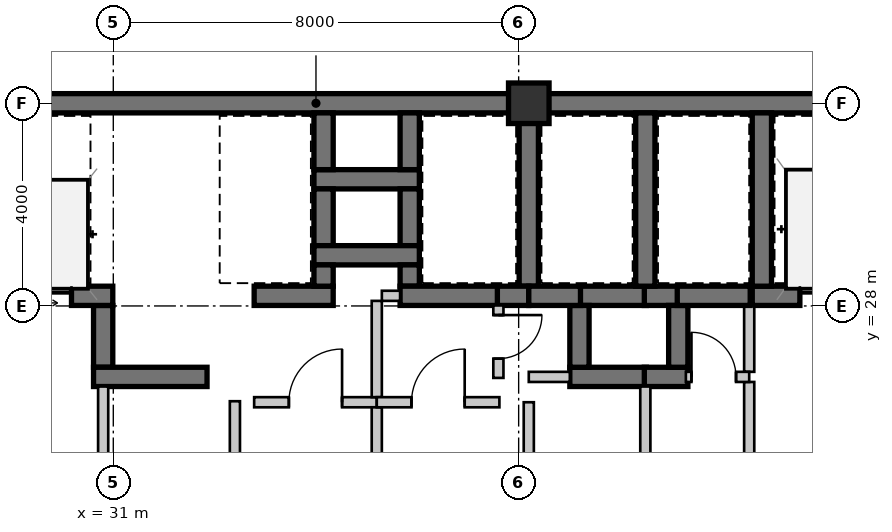
"""IFC4 building model, lengths in metres.
Left out: names, types, materials, properties, quantities, classifications, styles, units other than length and angle.
Written with IfcOpenShell. Run it as: python <this file> out.ifc"""

import sys

from ifc_helpers import new_model, si_unit, direction, frame, frame_2d, origin, origin_2d, place, context, subcontext, project, spatial, rectangle, extrude, source, transform, mapped, element, fill, save


model = new_model("IFC4")
c1 = context("Model", 3, precision=1e-05, world=origin(), true_north=direction((0.0, 1.0)))
c2 = subcontext(c1, "Body", "Model", "MODEL_VIEW")
j1 = project(units=[si_unit("LENGTHUNIT", "METRE"), si_unit("PLANEANGLEUNIT", "RADIAN")], contexts=[c1])
p1 = place(None, origin())
s1 = spatial("IfcSite", under=j1, at=p1, CompositionType="ELEMENT")
p2 = place(p1, origin())
s2 = spatial("IfcBuilding", under=s1, at=p2, CompositionType="ELEMENT")
p3 = place(p2, frame((0.0, 0.0, 26.25)))
s3 = spatial("IfcBuildingStorey", under=s2, at=p3, CompositionType="ELEMENT", Elevation=26.25)
m1 = source(origin(), c2, "Body", "SweptSolid", [
    extrude(rectangle(XDim=0.8, YDim=0.8, at=origin_2d()), origin(), (0.0, 0.0, 1.0), 3.15),
])
p4 = place(p3, frame((39.2, 32.0, 0.0), z_axis=(0.0, 0.0, 1.0), x_axis=(1.0, 0.0, 0.0)))
e1 = element("IfcColumn", 1, at=p4, inside=s3, PredefinedType="COLUMN", context=c2, shape_type="MappedRepresentation", body=[
    mapped(m1, transform((0.0, 0.0, 0.0), scale=1.0)),
])
m2 = source(origin(), c2, "Body", "SweptSolid", [
    extrude(rectangle(XDim=11.2, YDim=0.38, at=frame_2d((5.6, 0.0))), origin(), (0.0, 0.0, 1.0), 2.93),
])
p5 = place(p3, frame((28.0, 32.0, 0.0), z_axis=(0.0, 0.0, 1.0), x_axis=(1.0, 0.0, 0.0)))
e2 = element("IfcWall", 2, at=p5, inside=s3, PredefinedType="SHEAR", context=c2, shape_type="MappedRepresentation", body=[
    mapped(m2, transform((0.0, 0.0, 0.0), scale=1.0)),
])
m3 = source(origin(), c2, "Body", "SweptSolid", [
    extrude(rectangle(XDim=11.99, YDim=0.38, at=frame_2d((5.995, 0.0))), origin(), (0.0, 0.0, 1.0), 2.93),
])
p6 = place(p3, frame((39.2, 32.0, 0.0), z_axis=(0.0, 0.0, 1.0), x_axis=(1.0, 0.0, 0.0)))
e3 = element("IfcWall", 3, at=p6, inside=s3, PredefinedType="SHEAR", context=c2, shape_type="MappedRepresentation", body=[
    mapped(m3, transform((0.0, 0.0, 0.0), scale=1.0)),
])
m4 = source(origin(), c2, "Body", "SweptSolid", [
    extrude(rectangle(XDim=2.98, YDim=0.38, at=frame_2d((1.49, 0.0))), origin(), (0.0, 0.0, 1.0), 2.93),
])
p7 = place(p3, frame((43.61, 28.2, 0.0), z_axis=(0.0, 0.0, 1.0), x_axis=(1.0, 0.0, 0.0)))
e4 = element("IfcWall", 4, at=p7, inside=s3, PredefinedType="SHEAR", context=c2, shape_type="MappedRepresentation", body=[
    mapped(m4, transform((0.0, 0.0, 0.0), scale=1.0)),
])
m5 = source(origin(), c2, "Body", "SweptSolid", [
    extrude(rectangle(XDim=1.1, YDim=2.15, at=frame_2d((0.55, 1.075))), frame((0.0, 0.2, 0.0), z_axis=(0.0, -1.0, 0.0), x_axis=(1.0, 0.0, 0.0)), (0.0, 0.0, 1.0), 0.4),
])
p8 = place(p7, frame((0.94, 0.0, 0.0)))
e5 = element("IfcOpeningElement", 5, at=p8, cuts=e4, PredefinedType="OPENING", context=c2, shape_type="MappedRepresentation", body=[
    mapped(m5, transform((0.0, 0.0, 0.0), scale=1.0)),
])
m6 = source(origin(), c2, "Body", "SweptSolid", [
    extrude(rectangle(XDim=3.42, YDim=0.38, at=frame_2d((1.71, 0.0))), origin(), (0.0, 0.0, 1.0), 2.93),
])
p9 = place(p3, frame((43.8, 31.81, 0.0), z_axis=(0.0, 0.0, 1.0), x_axis=(0.0, -1.0, 0.0)))
e6 = element("IfcWall", 6, at=p9, inside=s3, PredefinedType="SHEAR", context=c2, shape_type="MappedRepresentation", body=[
    mapped(m6, transform((0.0, 0.0, 0.0), scale=1.0)),
])
m7 = source(origin(), c2, "Body", "SweptSolid", [
    extrude(rectangle(XDim=2.4, YDim=0.2, at=frame_2d((1.2, 0.0))), origin(), (0.0, 0.0, 1.0), 2.93),
])
p10 = place(p3, frame((43.55, 26.5, 0.0), z_axis=(0.0, 0.0, 1.0), x_axis=(0.0, -1.0, 0.0)))
e7 = element("IfcWall", 7, at=p10, inside=s3, PredefinedType="SOLIDWALL", context=c2, shape_type="MappedRepresentation", body=[
    mapped(m7, transform((0.0, 0.0, 0.0), scale=1.0)),
])
m8 = source(origin(), c2, "Body", "SweptSolid", [
    extrude(rectangle(XDim=1.31, YDim=0.2, at=frame_2d((0.655, 0.0))), origin(), (0.0, 0.0, 1.0), 2.93),
])
p11 = place(p3, frame((43.55, 28.01, 0.0), z_axis=(0.0, 0.0, 1.0), x_axis=(0.0, -1.0, 0.0)))
e8 = element("IfcWall", 8, at=p11, inside=s3, PredefinedType="SOLIDWALL", context=c2, shape_type="MappedRepresentation", body=[
    mapped(m8, transform((0.0, 0.0, 0.0), scale=1.0)),
])
m9 = source(origin(), c2, "Body", "SweptSolid", [
    extrude(rectangle(XDim=2.08, YDim=0.38, at=frame_2d((1.04, 0.0))), origin(), (0.0, 0.0, 1.0), 2.93),
])
p12 = place(p3, frame((34.96, 30.5, 0.0), z_axis=(0.0, 0.0, 1.0), x_axis=(1.0, 0.0, 0.0)))
e9 = element("IfcWall", 9, at=p12, inside=s3, PredefinedType="SHEAR", context=c2, shape_type="MappedRepresentation", body=[
    mapped(m9, transform((0.0, 0.0, 0.0), scale=1.0)),
])
m10 = source(origin(), c2, "Body", "SweptSolid", [
    extrude(rectangle(XDim=1.12, YDim=0.38, at=frame_2d((0.56, 0.0))), origin(), (0.0, 0.0, 1.0), 2.93),
])
for number, where, z_axis, x_axis in (
    (10, (35.15, 31.81, 0.0), (0.0, 0.0, 1.0), (0.0, -1.0, 0.0)),
    (11, (36.85, 30.69, 0.0), (0.0, 0.0, 1.0), (0.0, 1.0, 0.0)),
    (12, (35.15, 30.31, 0.0), (0.0, 0.0, 1.0), (0.0, -1.0, 0.0)),
    (13, (36.85, 29.19, 0.0), (0.0, 0.0, 1.0), (0.0, 1.0, 0.0)),
):
    element("IfcWall", number, at=place(p3, frame(where, z_axis=z_axis, x_axis=x_axis)), inside=s3, PredefinedType="SHEAR", context=c2, shape_type="MappedRepresentation", body=[
        mapped(m10, transform((0.0, 0.0, 0.0), scale=1.0)),
    ])
p13 = place(p3, frame((34.96, 29.0, 0.0), z_axis=(0.0, 0.0, 1.0), x_axis=(1.0, 0.0, 0.0)))
e14 = element("IfcWall", 14, at=p13, inside=s3, PredefinedType="SHEAR", context=c2, shape_type="MappedRepresentation", body=[
    mapped(m9, transform((0.0, 0.0, 0.0), scale=1.0)),
])
m11 = source(origin(), c2, "Body", "SweptSolid", [
    extrude(rectangle(XDim=1.22, YDim=0.38, at=frame_2d((0.61, 0.0))), origin(), (0.0, 0.0, 1.0), 2.93),
])
p14 = place(p3, frame((30.8, 28.01, 0.0), z_axis=(0.0, 0.0, 1.0), x_axis=(0.0, -1.0, 0.0)))
e15 = element("IfcWall", 15, at=p14, inside=s3, PredefinedType="SHEAR", context=c2, shape_type="MappedRepresentation", body=[
    mapped(m11, transform((0.0, 0.0, 0.0), scale=1.0)),
])
m12 = source(origin(), c2, "Body", "SweptSolid", [
    extrude(rectangle(XDim=2.24, YDim=0.38, at=frame_2d((1.12, 0.0))), origin(), (0.0, 0.0, 1.0), 2.93),
])
p15 = place(p3, frame((30.61, 26.6, 0.0), z_axis=(0.0, 0.0, 1.0), x_axis=(1.0, 0.0, 0.0)))
e16 = element("IfcWall", 16, at=p15, inside=s3, PredefinedType="SHEAR", context=c2, shape_type="MappedRepresentation", body=[
    mapped(m12, transform((0.0, 0.0, 0.0), scale=1.0)),
])
m13 = source(origin(), c2, "Body", "SweptSolid", [
    extrude(rectangle(XDim=1.32, YDim=0.38, at=frame_2d((0.66, 0.0))), origin(), (0.0, 0.0, 1.0), 2.93),
])
p16 = place(p3, frame((41.52, 28.2, 0.0), z_axis=(0.0, 0.0, 1.0), x_axis=(-1.0, 0.0, 0.0)))
e17 = element("IfcWall", 17, at=p16, inside=s3, PredefinedType="SHEAR", context=c2, shape_type="MappedRepresentation", body=[
    mapped(m13, transform((0.0, 0.0, 0.0), scale=1.0)),
])
m14 = source(origin(), c2, "Body", "SweptSolid", [
    extrude(rectangle(XDim=0.67, YDim=0.38, at=frame_2d((0.335, 0.0))), origin(), (0.0, 0.0, 1.0), 2.93),
])
p17 = place(p3, frame((42.15, 28.2, 0.0), z_axis=(0.0, 0.0, 1.0), x_axis=(-1.0, 0.0, 0.0)))
e18 = element("IfcWall", 18, at=p17, inside=s3, PredefinedType="SHEAR", context=c2, shape_type="MappedRepresentation", body=[
    mapped(m14, transform((0.0, 0.0, 0.0), scale=1.0)),
])
m15 = source(origin(), c2, "Body", "SweptSolid", [
    extrude(rectangle(XDim=1.51, YDim=0.38, at=frame_2d((0.755, 0.0))), origin(), (0.0, 0.0, 1.0), 2.93),
])
p18 = place(p3, frame((40.01, 26.6, 0.0), z_axis=(0.0, 0.0, 1.0), x_axis=(1.0, 0.0, 0.0)))
e19 = element("IfcWall", 19, at=p18, inside=s3, PredefinedType="SHEAR", context=c2, shape_type="MappedRepresentation", body=[
    mapped(m15, transform((0.0, 0.0, 0.0), scale=1.0)),
])
p19 = place(p3, frame((40.2, 28.01, 0.0), z_axis=(0.0, 0.0, 1.0), x_axis=(0.0, -1.0, 0.0)))
e20 = element("IfcWall", 20, at=p19, inside=s3, PredefinedType="SHEAR", context=c2, shape_type="MappedRepresentation", body=[
    mapped(m11, transform((0.0, 0.0, 0.0), scale=1.0)),
])
m16 = source(origin(), c2, "Body", "SweptSolid", [
    extrude(rectangle(XDim=0.86, YDim=0.38, at=frame_2d((0.43, 0.0))), origin(), (0.0, 0.0, 1.0), 2.93),
])
p20 = place(p3, frame((41.48, 26.6, 0.0), z_axis=(0.0, 0.0, 1.0), x_axis=(1.0, 0.0, 0.0)))
e21 = element("IfcWall", 21, at=p20, inside=s3, PredefinedType="SHEAR", context=c2, shape_type="MappedRepresentation", body=[
    mapped(m16, transform((0.0, 0.0, 0.0), scale=1.0)),
])
p21 = place(p3, frame((42.15, 26.79, 0.0), z_axis=(0.0, 0.0, 1.0), x_axis=(0.0, 1.0, 0.0)))
e22 = element("IfcWall", 22, at=p21, inside=s3, PredefinedType="SHEAR", context=c2, shape_type="MappedRepresentation", body=[
    mapped(m11, transform((0.0, 0.0, 0.0), scale=1.0)),
])
m17 = source(origin(), c2, "Body", "SweptSolid", [
    extrude(rectangle(XDim=2.49, YDim=0.38, at=frame_2d((1.245, 0.0))), origin(), (0.0, 0.0, 1.0), 2.93),
])
p22 = place(p3, frame((28.5, 28.2, 0.0), z_axis=(0.0, 0.0, 1.0), x_axis=(1.0, 0.0, 0.0)))
e23 = element("IfcWall", 23, at=p22, inside=s3, PredefinedType="SHEAR", context=c2, shape_type="MappedRepresentation", body=[
    mapped(m17, transform((0.0, 0.0, 0.0), scale=1.0)),
])
m18 = source(origin(), c2, "Body", "SweptSolid", [
    extrude(rectangle(XDim=1.05, YDim=2.15, at=frame_2d((0.525, 1.075))), frame((0.0, 0.2, 0.0), z_axis=(0.0, -1.0, 0.0), x_axis=(1.0, 0.0, 0.0)), (0.0, 0.0, 1.0), 0.4),
])
p23 = place(p22, frame((0.625, 0.0, 0.0)))
e24 = element("IfcOpeningElement", 24, at=p23, cuts=e23, PredefinedType="OPENING", context=c2, shape_type="MappedRepresentation", body=[
    mapped(m18, transform((0.0, 0.0, 0.0), scale=1.0)),
])
m19 = source(origin(), c2, "Body", "SweptSolid", [
    extrude(rectangle(XDim=2.31, YDim=0.2, at=frame_2d((1.155, 0.0))), origin(), (0.0, 0.0, 1.0), 2.93),
])
p24 = place(p3, frame((30.8, 26.41, 0.0), z_axis=(0.0, 0.0, 1.0), x_axis=(0.0, -1.0, 0.0)))
e25 = element("IfcWall", 25, at=p24, inside=s3, PredefinedType="SOLIDWALL", context=c2, shape_type="MappedRepresentation", body=[
    mapped(m19, transform((0.0, 0.0, 0.0), scale=1.0)),
])
m20 = source(origin(), c2, "Body", "SweptSolid", [
    extrude(rectangle(XDim=1.56, YDim=0.38, at=frame_2d((0.78, 0.0))), origin(), (0.0, 0.0, 1.0), 2.93),
])
p25 = place(p3, frame((33.78, 28.2, 0.0), z_axis=(0.0, 0.0, 1.0), x_axis=(1.0, 0.0, 0.0)))
e26 = element("IfcWall", 26, at=p25, inside=s3, PredefinedType="SHEAR", context=c2, shape_type="MappedRepresentation", body=[
    mapped(m20, transform((0.0, 0.0, 0.0), scale=1.0)),
])
m21 = source(origin(), c2, "Body", "SweptSolid", [
    extrude(rectangle(XDim=0.42, YDim=0.38, at=frame_2d((0.21, 0.0))), origin(), (0.0, 0.0, 1.0), 2.93),
])
p26 = place(p3, frame((35.15, 28.39, 0.0), z_axis=(0.0, 0.0, 1.0), x_axis=(0.0, 1.0, 0.0)))
e27 = element("IfcWall", 27, at=p26, inside=s3, PredefinedType="SHEAR", context=c2, shape_type="MappedRepresentation", body=[
    mapped(m21, transform((0.0, 0.0, 0.0), scale=1.0)),
])
p27 = place(p3, frame((39.2, 28.39, 0.0), z_axis=(0.0, 0.0, 1.0), x_axis=(0.0, 1.0, 0.0)))
e28 = element("IfcWall", 28, at=p27, inside=s3, PredefinedType="SHEAR", context=c2, shape_type="MappedRepresentation", body=[
    mapped(m6, transform((0.0, 0.0, 0.0), scale=1.0)),
])
p28 = place(p3, frame((36.85, 28.81, 0.0), z_axis=(0.0, 0.0, 1.0), x_axis=(0.0, -1.0, 0.0)))
e29 = element("IfcWall", 29, at=p28, inside=s3, PredefinedType="SHEAR", context=c2, shape_type="MappedRepresentation", body=[
    mapped(m21, transform((0.0, 0.0, 0.0), scale=1.0)),
])
m22 = source(origin(), c2, "Body", "SweptSolid", [
    extrude(rectangle(XDim=1.96, YDim=0.38, at=frame_2d((0.98, 0.0))), origin(), (0.0, 0.0, 1.0), 2.93),
])
p29 = place(p3, frame((36.66, 28.2, 0.0), z_axis=(0.0, 0.0, 1.0), x_axis=(1.0, 0.0, 0.0)))
e30 = element("IfcWall", 30, at=p29, inside=s3, PredefinedType="SHEAR", context=c2, shape_type="MappedRepresentation", body=[
    mapped(m22, transform((0.0, 0.0, 0.0), scale=1.0)),
])
m23 = source(origin(), c2, "Body", "SweptSolid", [
    extrude(rectangle(XDim=0.62, YDim=0.38, at=frame_2d((0.31, 0.0))), origin(), (0.0, 0.0, 1.0), 2.93),
])
p30 = place(p3, frame((38.58, 28.2, 0.0), z_axis=(0.0, 0.0, 1.0), x_axis=(1.0, 0.0, 0.0)))
e31 = element("IfcWall", 31, at=p30, inside=s3, PredefinedType="SHEAR", context=c2, shape_type="MappedRepresentation", body=[
    mapped(m23, transform((0.0, 0.0, 0.0), scale=1.0)),
])
p31 = place(p3, frame((41.5, 28.39, 0.0), z_axis=(0.0, 0.0, 1.0), x_axis=(0.0, 1.0, 0.0)))
e32 = element("IfcWall", 32, at=p31, inside=s3, PredefinedType="SHEAR", context=c2, shape_type="MappedRepresentation", body=[
    mapped(m6, transform((0.0, 0.0, 0.0), scale=1.0)),
])
m24 = source(origin(), c2, "Body", "SweptSolid", [
    extrude(rectangle(XDim=1.02, YDim=0.38, at=frame_2d((0.51, 0.0))), origin(), (0.0, 0.0, 1.0), 2.93),
])
p32 = place(p3, frame((39.2, 28.2, 0.0), z_axis=(0.0, 0.0, 1.0), x_axis=(1.0, 0.0, 0.0)))
e33 = element("IfcWall", 33, at=p32, inside=s3, PredefinedType="SHEAR", context=c2, shape_type="MappedRepresentation", body=[
    mapped(m24, transform((0.0, 0.0, 0.0), scale=1.0)),
])
m25 = source(origin(), c2, "Body", "SweptSolid", [
    extrude(rectangle(XDim=1.44, YDim=0.38, at=frame_2d((0.72, 0.0))), origin(), (0.0, 0.0, 1.0), 2.93),
])
p33 = place(p3, frame((42.13, 28.2, 0.0), z_axis=(0.0, 0.0, 1.0), x_axis=(1.0, 0.0, 0.0)))
e34 = element("IfcWall", 34, at=p33, inside=s3, PredefinedType="SHEAR", context=c2, shape_type="MappedRepresentation", body=[
    mapped(m25, transform((0.0, 0.0, 0.0), scale=1.0)),
])
m26 = source(origin(), c2, "Body", "SweptSolid", [
    extrude(rectangle(XDim=2.02, YDim=0.2, at=frame_2d((1.01, 0.0))), origin(), (0.0, 0.0, 1.0), 2.93),
])
p34 = place(p3, frame((33.4, 26.12, 0.0), z_axis=(0.0, 0.0, 1.0), x_axis=(0.0, -1.0, 0.0)))
e35 = element("IfcWall", 35, at=p34, inside=s3, PredefinedType="SOLIDWALL", context=c2, shape_type="MappedRepresentation", body=[
    mapped(m26, transform((0.0, 0.0, 0.0), scale=1.0)),
])
m27 = source(origin(), c2, "Body", "SweptSolid", [
    extrude(rectangle(XDim=2.42, YDim=0.2, at=frame_2d((1.21, 0.0))), origin(), (0.0, 0.0, 1.0), 2.93),
])
p35 = place(p3, frame((33.78, 26.1, 0.0), z_axis=(0.0, 0.0, 1.0), x_axis=(1.0, 0.0, 0.0)))
e36 = element("IfcWall", 36, at=p35, inside=s3, PredefinedType="SOLIDWALL", context=c2, shape_type="MappedRepresentation", body=[
    mapped(m27, transform((0.0, 0.0, 0.0), scale=1.0)),
])
m28 = source(origin(), c2, "Body", "SweptSolid", [
    extrude(rectangle(XDim=1.05, YDim=2.1, at=frame_2d((0.525, 1.05))), frame((0.0, 0.11, 0.0), z_axis=(0.0, -1.0, 0.0), x_axis=(1.0, 0.0, 0.0)), (0.0, 0.0, 1.0), 0.22),
])
p36 = place(p35, frame((0.685, 0.0, 0.0)))
e37 = element("IfcOpeningElement", 37, at=p36, cuts=e36, PredefinedType="OPENING", context=c2, shape_type="MappedRepresentation", body=[
    mapped(m28, transform((0.0, 0.0, 0.0), scale=1.0)),
])
m29 = source(origin(), c2, "Body", "SweptSolid", [
    extrude(rectangle(XDim=1.9, YDim=0.2, at=frame_2d((0.95, 0.0))), origin(), (0.0, 0.0, 1.0), 2.93),
])
p37 = place(p3, frame((36.2, 26.0, 0.0), z_axis=(0.0, 0.0, 1.0), x_axis=(0.0, -1.0, 0.0)))
e38 = element("IfcWall", 38, at=p37, inside=s3, PredefinedType="SOLIDWALL", context=c2, shape_type="MappedRepresentation", body=[
    mapped(m29, transform((0.0, 0.0, 0.0), scale=1.0)),
])
m30 = source(origin(), c2, "Body", "SweptSolid", [
    extrude(rectangle(XDim=1.9, YDim=0.2, at=frame_2d((0.95, 0.0))), origin(), (0.0, 0.0, 1.0), 2.93),
])
p38 = place(p3, frame((36.2, 28.1, 0.0), z_axis=(0.0, 0.0, 1.0), x_axis=(0.0, -1.0, 0.0)))
e39 = element("IfcWall", 39, at=p38, inside=s3, PredefinedType="SOLIDWALL", context=c2, shape_type="MappedRepresentation", body=[
    mapped(m30, transform((0.0, 0.0, 0.0), scale=1.0)),
])
m31 = source(origin(), c2, "Body", "SweptSolid", [
    extrude(rectangle(XDim=0.36, YDim=0.2, at=frame_2d((0.18, 0.0))), origin(), (0.0, 0.0, 1.0), 2.93),
])
p39 = place(p3, frame((36.66, 28.2, 0.0), z_axis=(0.0, 0.0, 1.0), x_axis=(-1.0, 0.0, 0.0)))
e40 = element("IfcWall", 40, at=p39, inside=s3, PredefinedType="SOLIDWALL", context=c2, shape_type="MappedRepresentation", body=[
    mapped(m31, transform((0.0, 0.0, 0.0), scale=1.0)),
])
m32 = source(origin(), c2, "Body", "SweptSolid", [
    extrude(rectangle(XDim=2.42, YDim=0.2, at=frame_2d((1.21, 0.0))), origin(), (0.0, 0.0, 1.0), 2.93),
])
p40 = place(p3, frame((36.2, 26.1, 0.0), z_axis=(0.0, 0.0, 1.0), x_axis=(1.0, 0.0, 0.0)))
e41 = element("IfcWall", 41, at=p40, inside=s3, PredefinedType="SOLIDWALL", context=c2, shape_type="MappedRepresentation", body=[
    mapped(m32, transform((0.0, 0.0, 0.0), scale=1.0)),
])
p41 = place(p40, frame((0.685, 0.0, 0.0)))
e42 = element("IfcOpeningElement", 42, at=p41, cuts=e41, PredefinedType="OPENING", context=c2, shape_type="MappedRepresentation", body=[
    mapped(m28, transform((0.0, 0.0, 0.0), scale=1.0)),
])
m33 = source(origin(), c2, "Body", "SweptSolid", [
    extrude(rectangle(XDim=2.0, YDim=0.2, at=frame_2d((1.0, 0.0))), origin(), (0.0, 0.0, 1.0), 2.47),
])
p42 = place(p3, frame((39.2, 26.1, 0.0), z_axis=(0.0, 0.0, 1.0), x_axis=(0.0, -1.0, 0.0)))
e43 = element("IfcWall", 43, at=p42, inside=s3, PredefinedType="SOLIDWALL", context=c2, shape_type="MappedRepresentation", body=[
    mapped(m33, transform((0.0, 0.0, 0.0), scale=1.0)),
])
m34 = source(origin(), c2, "Body", "SweptSolid", [
    extrude(rectangle(XDim=1.43, YDim=0.2, at=frame_2d((0.715, 0.0))), origin(), (0.0, 0.0, 1.0), 2.93),
])
p43 = place(p3, frame((38.6, 28.01, 0.0), z_axis=(0.0, 0.0, 1.0), x_axis=(0.0, -1.0, 0.0)))
e44 = element("IfcWall", 44, at=p43, inside=s3, PredefinedType="SOLIDWALL", context=c2, shape_type="MappedRepresentation", body=[
    mapped(m34, transform((0.0, 0.0, 0.0), scale=1.0)),
])
m35 = source(origin(), c2, "Body", "SweptSolid", [
    extrude(rectangle(XDim=0.86, YDim=2.1, at=frame_2d((0.43, 1.05))), frame((0.0, 0.11, 0.0), z_axis=(0.0, -1.0, 0.0), x_axis=(1.0, 0.0, 0.0)), (0.0, 0.0, 1.0), 0.22),
])
p44 = place(p43, frame((0.19, 0.0, 0.0)))
e45 = element("IfcOpeningElement", 45, at=p44, cuts=e44, PredefinedType="OPENING", context=c2, shape_type="MappedRepresentation", body=[
    mapped(m35, transform((0.0, 0.0, 0.0), scale=1.0)),
])
m36 = source(origin(), c2, "Body", "SweptSolid", [
    extrude(rectangle(XDim=0.81, YDim=0.2, at=frame_2d((0.405, 0.0))), origin(), (0.0, 0.0, 1.0), 2.93),
])
p45 = place(p3, frame((39.2, 26.6, 0.0), z_axis=(0.0, 0.0, 1.0), x_axis=(1.0, 0.0, 0.0)))
e46 = element("IfcWall", 46, at=p45, inside=s3, PredefinedType="SOLIDWALL", context=c2, shape_type="MappedRepresentation", body=[
    mapped(m36, transform((0.0, 0.0, 0.0), scale=1.0)),
])
p46 = place(p3, frame((41.5, 26.41, 0.0), z_axis=(0.0, 0.0, 1.0), x_axis=(0.0, -1.0, 0.0)))
e47 = element("IfcWall", 47, at=p46, inside=s3, PredefinedType="SOLIDWALL", context=c2, shape_type="MappedRepresentation", body=[
    mapped(m19, transform((0.0, 0.0, 0.0), scale=1.0)),
])
m37 = source(origin(), c2, "Body", "SweptSolid", [
    extrude(rectangle(XDim=1.25, YDim=0.2, at=frame_2d((0.625, 0.0))), origin(), (0.0, 0.0, 1.0), 2.93),
])
p47 = place(p3, frame((42.3, 26.6, 0.0), z_axis=(0.0, 0.0, 1.0), x_axis=(1.0, 0.0, 0.0)))
e48 = element("IfcWall", 48, at=p47, inside=s3, PredefinedType="SOLIDWALL", context=c2, shape_type="MappedRepresentation", body=[
    mapped(m37, transform((0.0, 0.0, 0.0), scale=1.0)),
])
m38 = source(origin(), c2, "Body", "SweptSolid", [
    extrude(rectangle(XDim=0.88, YDim=2.1, at=frame_2d((0.44, 1.05))), frame((0.0, 0.11, 0.0), z_axis=(0.0, -1.0, 0.0), x_axis=(1.0, 0.0, 0.0)), (0.0, 0.0, 1.0), 0.22),
])
p48 = place(p47, frame((0.11, 0.0, 0.0)))
e49 = element("IfcOpeningElement", 49, at=p48, cuts=e48, PredefinedType="OPENING", context=c2, shape_type="MappedRepresentation", body=[
    mapped(m38, transform((0.0, 0.0, 0.0), scale=1.0)),
])
m39 = source(origin(), c2, "Body", "SweptSolid", [
    extrude(rectangle(XDim=1.1, YDim=2.15, at=frame_2d((0.55, 1.075))), frame((0.0, 0.025, 0.0), z_axis=(0.0, -1.0, 0.0), x_axis=(1.0, 0.0, 0.0)), (0.0, 0.0, 1.0), 0.05),
])
p49 = place(p8, origin())
e50 = element("IfcDoor", 50, at=p49, inside=s3, OperationType="SLIDING_TO_LEFT", PredefinedType="DOOR", context=c2, shape_type="MappedRepresentation", body=[
    mapped(m39, transform((0.0, 0.0, 0.0), scale=1.0)),
])
fill(e5, e50)
m40 = source(origin(), c2, "Body", "SweptSolid", [
    extrude(rectangle(XDim=1.05, YDim=2.15, at=frame_2d((0.525, 1.075))), frame((0.0, 0.025, 0.0), z_axis=(0.0, -1.0, 0.0), x_axis=(1.0, 0.0, 0.0)), (0.0, 0.0, 1.0), 0.05),
])
p50 = place(p23, origin())
e51 = element("IfcDoor", 51, at=p50, inside=s3, OperationType="SLIDING_TO_LEFT", PredefinedType="DOOR", context=c2, shape_type="MappedRepresentation", body=[
    mapped(m40, transform((0.0, 0.0, 0.0), scale=1.0)),
])
fill(e24, e51)
m41 = source(origin(), c2, "Body", "SweptSolid", [
    extrude(rectangle(XDim=1.05, YDim=2.1, at=frame_2d((0.525, 1.05))), frame((0.0, 0.025, 0.0), z_axis=(0.0, -1.0, 0.0), x_axis=(1.0, 0.0, 0.0)), (0.0, 0.0, 1.0), 0.05),
])
p51 = place(p36, origin())
e52 = element("IfcDoor", 52, at=p51, inside=s3, OperationType="SINGLE_SWING_RIGHT", PredefinedType="DOOR", context=c2, shape_type="MappedRepresentation", body=[
    mapped(m41, transform((0.0, 0.0, 0.0), scale=1.0)),
])
fill(e37, e52)
p52 = place(p41, origin())
e53 = element("IfcDoor", 53, at=p52, inside=s3, OperationType="SINGLE_SWING_RIGHT", PredefinedType="DOOR", context=c2, shape_type="MappedRepresentation", body=[
    mapped(m41, transform((0.0, 0.0, 0.0), scale=1.0)),
])
fill(e42, e53)
m42 = source(origin(), c2, "Body", "SweptSolid", [
    extrude(rectangle(XDim=0.88, YDim=2.1, at=frame_2d((0.44, 1.05))), frame((0.0, 0.025, 0.0), z_axis=(0.0, -1.0, 0.0), x_axis=(1.0, 0.0, 0.0)), (0.0, 0.0, 1.0), 0.05),
])
p53 = place(p48, origin())
e54 = element("IfcDoor", 54, at=p53, inside=s3, OperationType="SINGLE_SWING_LEFT", PredefinedType="DOOR", context=c2, shape_type="MappedRepresentation", body=[
    mapped(m42, transform((0.0, 0.0, 0.0), scale=1.0)),
])
fill(e49, e54)
m43 = source(origin(), c2, "Body", "SweptSolid", [
    extrude(rectangle(XDim=0.86, YDim=2.1, at=frame_2d((0.43, 1.05))), frame((0.0, 0.025, 0.0), z_axis=(0.0, -1.0, 0.0), x_axis=(1.0, 0.0, 0.0)), (0.0, 0.0, 1.0), 0.05),
])
p54 = place(p44, origin())
e55 = element("IfcDoor", 55, at=p54, inside=s3, OperationType="SINGLE_SWING_LEFT", PredefinedType="DOOR", context=c2, shape_type="MappedRepresentation", body=[
    mapped(m43, transform((0.0, 0.0, 0.0), scale=1.0)),
])
fill(e45, e55)
save(model, sys.argv[1])
